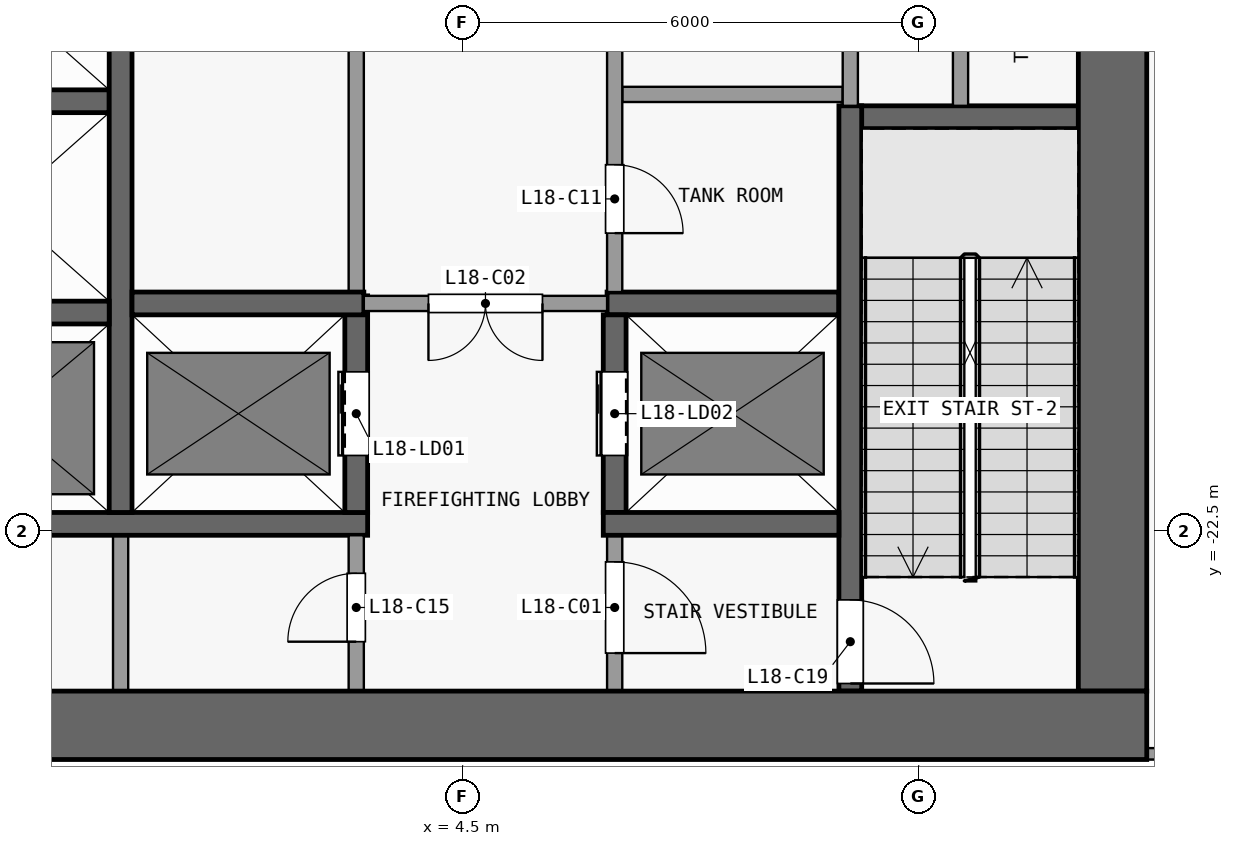
"""IFC4 building model, lengths in metres.
Left out: names, types, materials, properties, quantities, classifications, styles, units other than length and angle.
Written with IfcOpenShell. Run it as: python <this file> out.ifc"""

import sys

from ifc_helpers import new_model, si_unit, direction, frame, frame_2d, origin, place, context, subcontext, project, spatial, rectangle, extrude, element, fill, save


model = new_model("IFC4")
c1 = context("Model", 3, precision=1e-05, world=origin(), true_north=direction((0.0, 1.0)))
c2 = subcontext(c1, "Body", "Model", "MODEL_VIEW")
j1 = project(units=[si_unit("LENGTHUNIT", "METRE"), si_unit("PLANEANGLEUNIT", "RADIAN")], contexts=[c1])
p1 = place(None, origin())
s1 = spatial("IfcSite", under=j1, at=p1, CompositionType="ELEMENT")
p2 = place(p1, origin())
s2 = spatial("IfcBuilding", under=s1, at=p2, CompositionType="ELEMENT")
p3 = place(p2, frame((0.0, 0.0, 75.7)))
s3 = spatial("IfcBuildingStorey", under=s2, at=p3, CompositionType="ELEMENT", Elevation=75.7)
p4 = place(p3, frame((-13.5, -25.05, 0.0), z_axis=(0.0, 0.0, 1.0), x_axis=(1.0, 0.0, 0.0)))
e1 = element("IfcWall", 1, at=p4, inside=s3, PredefinedType="SHEAR", context=c2, shape_type="SweptSolid", body=[
    extrude(rectangle(XDim=27.0, YDim=0.9, at=frame_2d((13.5, 0.0))), origin(), (0.0, 0.0, 1.0), 5.0),
])
p5 = place(p3, frame((13.05, -24.6, 0.0), z_axis=(0.0, 0.0, 1.0), x_axis=(0.0, 1.0, 0.0)))
e2 = element("IfcWall", 2, at=p5, inside=s3, PredefinedType="SHEAR", context=c2, shape_type="SweptSolid", body=[
    extrude(rectangle(XDim=16.1, YDim=0.9, at=frame_2d((8.05, 0.0))), origin(), (0.0, 0.0, 1.0), 5.0),
])
p6 = place(p3, frame((-2.95, -22.4, 0.0), z_axis=(0.0, 0.0, 1.0), x_axis=(1.0, 0.0, 0.0)))
e3 = element("IfcWall", 3, at=p6, inside=s3, PredefinedType="SHEAR", context=c2, shape_type="SweptSolid", body=[
    extrude(rectangle(XDim=6.2, YDim=0.3, at=frame_2d((3.1, 0.0))), origin(), (0.0, 0.0, 1.0), 5.0),
])
p7 = place(p3, frame((6.35, -22.4, 0.0), z_axis=(0.0, 0.0, 1.0), x_axis=(1.0, 0.0, 0.0)))
e4 = element("IfcWall", 4, at=p7, inside=s3, PredefinedType="SHEAR", context=c2, shape_type="SweptSolid", body=[
    extrude(rectangle(XDim=3.1, YDim=0.3, at=frame_2d((1.55, 0.0))), origin(), (0.0, 0.0, 1.0), 5.0),
])
p8 = place(p3, frame((-2.95, -19.62, 0.0), z_axis=(0.0, 0.0, 1.0), x_axis=(1.0, 0.0, 0.0)))
e5 = element("IfcWall", 5, at=p8, inside=s3, PredefinedType="SHEAR", context=c2, shape_type="SweptSolid", body=[
    extrude(rectangle(XDim=2.8, YDim=0.3, at=frame_2d((1.4, 0.0))), origin(), (0.0, 0.0, 1.0), 5.0),
])
p9 = place(p3, frame((0.15, -19.5, 0.0), z_axis=(0.0, 0.0, 1.0), x_axis=(1.0, 0.0, 0.0)))
e6 = element("IfcWall", 6, at=p9, inside=s3, PredefinedType="SHEAR", context=c2, shape_type="SweptSolid", body=[
    extrude(rectangle(XDim=3.05, YDim=0.3, at=frame_2d((1.525, 0.0))), origin(), (0.0, 0.0, 1.0), 5.0),
])
p10 = place(p3, frame((6.4, -19.5, 0.0), z_axis=(0.0, 0.0, 1.0), x_axis=(-1.0, 0.0, 0.0)))
e7 = element("IfcWall", 7, at=p10, inside=s3, PredefinedType="PARTITIONING", context=c2, shape_type="SweptSolid", body=[
    extrude(rectangle(XDim=3.2, YDim=0.2, at=frame_2d((1.6, 0.0))), origin(), (0.0, 0.0, 1.0), 5.0),
])
p11 = place(p10, frame((0.85, 0.0, 0.0)))
e8 = element("IfcOpeningElement", 8, at=p11, cuts=e7, PredefinedType="OPENING", context=c2, shape_type="SweptSolid", body=[
    extrude(rectangle(XDim=1.5, YDim=2.1, at=frame_2d((0.75, 1.05))), frame((0.0, 0.11, 0.0), z_axis=(0.0, -1.0, 0.0), x_axis=(1.0, 0.0, 0.0)), (0.0, 0.0, 1.0), 0.22),
])
p12 = place(p3, frame((6.4, -19.5, 0.0), z_axis=(0.0, 0.0, 1.0), x_axis=(1.0, 0.0, 0.0)))
e9 = element("IfcWall", 9, at=p12, inside=s3, PredefinedType="SHEAR", context=c2, shape_type="SweptSolid", body=[
    extrude(rectangle(XDim=3.05, YDim=0.3, at=frame_2d((1.525, 0.0))), origin(), (0.0, 0.0, 1.0), 5.0),
])
p13 = place(p3, frame((9.5, -17.05, 0.0), z_axis=(0.0, 0.0, 1.0), x_axis=(1.0, 0.0, 0.0)))
e10 = element("IfcWall", 10, at=p13, inside=s3, PredefinedType="SHEAR", context=c2, shape_type="SweptSolid", body=[
    extrude(rectangle(XDim=3.1, YDim=0.3, at=frame_2d((1.55, 0.0))), origin(), (0.0, 0.0, 1.0), 5.0),
])
p14 = place(p3, frame((-2.95, -16.84, 0.0), z_axis=(0.0, 0.0, 1.0), x_axis=(1.0, 0.0, 0.0)))
e11 = element("IfcWall", 11, at=p14, inside=s3, PredefinedType="SHEAR", context=c2, shape_type="SweptSolid", body=[
    extrude(rectangle(XDim=2.8, YDim=0.3, at=frame_2d((1.4, 0.0))), origin(), (0.0, 0.0, 1.0), 5.0),
])
p15 = place(p3, frame((6.6, -16.75, 0.0), z_axis=(0.0, 0.0, 1.0), x_axis=(1.0, 0.0, 0.0)))
e12 = element("IfcWall", 12, at=p15, inside=s3, PredefinedType="PARTITIONING", context=c2, shape_type="SweptSolid", body=[
    extrude(rectangle(XDim=2.9, YDim=0.2, at=frame_2d((1.45, 0.0))), origin(), (0.0, 0.0, 1.0), 5.0),
])
p16 = place(p3, frame((0.0, -24.6, 0.0), z_axis=(0.0, 0.0, 1.0), x_axis=(0.0, 1.0, 0.0)))
e13 = element("IfcWall", 13, at=p16, inside=s3, PredefinedType="PARTITIONING", context=c2, shape_type="SweptSolid", body=[
    extrude(rectangle(XDim=2.05, YDim=0.2, at=frame_2d((1.025, 0.0))), origin(), (0.0, 0.0, 1.0), 5.0),
])
p17 = place(p3, frame((0.0, -22.25, 0.0), z_axis=(0.0, 0.0, 1.0), x_axis=(0.0, 1.0, 0.0)))
e14 = element("IfcWall", 14, at=p17, inside=s3, PredefinedType="SHEAR", context=c2, shape_type="SweptSolid", body=[
    extrude(rectangle(XDim=13.75, YDim=0.3, at=frame_2d((6.875, 0.0))), origin(), (0.0, 0.0, 1.0), 5.0),
])
p18 = place(p3, frame((3.1, -24.6, 0.0), z_axis=(0.0, 0.0, 1.0), x_axis=(0.0, 1.0, 0.0)))
e15 = element("IfcWall", 15, at=p18, inside=s3, PredefinedType="PARTITIONING", context=c2, shape_type="SweptSolid", body=[
    extrude(rectangle(XDim=2.05, YDim=0.2, at=frame_2d((1.025, 0.0))), origin(), (0.0, 0.0, 1.0), 5.0),
])
p19 = place(p18, frame((0.65, 0.0, 0.0)))
e16 = element("IfcOpeningElement", 16, at=p19, cuts=e15, PredefinedType="OPENING", context=c2, shape_type="SweptSolid", body=[
    extrude(rectangle(XDim=0.9, YDim=2.1, at=frame_2d((0.45, 1.05))), frame((0.0, 0.11, 0.0), z_axis=(0.0, -1.0, 0.0), x_axis=(1.0, 0.0, 0.0)), (0.0, 0.0, 1.0), 0.22),
])
p20 = place(p3, frame((3.1, -22.25, 0.0), z_axis=(0.0, 0.0, 1.0), x_axis=(0.0, 1.0, 0.0)))
e17 = element("IfcWall", 17, at=p20, inside=s3, PredefinedType="SHEAR", context=c2, shape_type="SweptSolid", body=[
    extrude(rectangle(XDim=2.85, YDim=0.3, at=frame_2d((1.425, 0.0))), origin(), (0.0, 0.0, 1.0), 5.0),
])
p21 = place(p20, frame((0.75, 0.0, 0.0)))
e18 = element("IfcOpeningElement", 18, at=p21, cuts=e17, PredefinedType="OPENING", context=c2, shape_type="SweptSolid", body=[
    extrude(rectangle(XDim=1.1, YDim=2.1, at=frame_2d((0.55, 1.05))), frame((0.0, 0.16, 0.0), z_axis=(0.0, -1.0, 0.0), x_axis=(1.0, 0.0, 0.0)), (0.0, 0.0, 1.0), 0.32),
])
p22 = place(p3, frame((3.1, -19.6, 0.0), z_axis=(0.0, 0.0, 1.0), x_axis=(0.0, 1.0, 0.0)))
e19 = element("IfcWall", 19, at=p22, inside=s3, PredefinedType="PARTITIONING", context=c2, shape_type="SweptSolid", body=[
    extrude(rectangle(XDim=11.1, YDim=0.2, at=frame_2d((5.55, 0.0))), origin(), (0.0, 0.0, 1.0), 5.0),
])
p23 = place(p22, frame((3.625, 0.0, 0.0)))
e20 = element("IfcOpeningElement", 20, at=p23, cuts=e19, PredefinedType="OPENING", context=c2, shape_type="SweptSolid", body=[
    extrude(rectangle(XDim=1.2, YDim=2.1, at=frame_2d((0.6, 1.05))), frame((0.0, 0.11, 0.0), z_axis=(0.0, -1.0, 0.0), x_axis=(1.0, 0.0, 0.0)), (0.0, 0.0, 1.0), 0.22),
])
p24 = place(p22, frame((9.275, 0.0, 0.0)))
e21 = element("IfcOpeningElement", 21, at=p24, cuts=e19, PredefinedType="OPENING", context=c2, shape_type="SweptSolid", body=[
    extrude(rectangle(XDim=0.9, YDim=2.1, at=frame_2d((0.45, 1.05))), frame((0.0, 0.11, 0.0), z_axis=(0.0, -1.0, 0.0), x_axis=(1.0, 0.0, 0.0)), (0.0, 0.0, 1.0), 0.22),
])
p25 = place(p3, frame((6.5, -22.55, 0.0), z_axis=(0.0, 0.0, 1.0), x_axis=(0.0, -1.0, 0.0)))
e22 = element("IfcWall", 22, at=p25, inside=s3, PredefinedType="PARTITIONING", context=c2, shape_type="SweptSolid", body=[
    extrude(rectangle(XDim=2.05, YDim=0.2, at=frame_2d((1.025, 0.0))), origin(), (0.0, 0.0, 1.0), 5.0),
])
p26 = place(p25, frame((0.35, 0.0, 0.0)))
e23 = element("IfcOpeningElement", 23, at=p26, cuts=e22, PredefinedType="OPENING", context=c2, shape_type="SweptSolid", body=[
    extrude(rectangle(XDim=1.2, YDim=2.1, at=frame_2d((0.6, 1.05))), frame((0.0, 0.11, 0.0), z_axis=(0.0, -1.0, 0.0), x_axis=(1.0, 0.0, 0.0)), (0.0, 0.0, 1.0), 0.22),
])
p27 = place(p3, frame((6.5, -22.25, 0.0), z_axis=(0.0, 0.0, 1.0), x_axis=(0.0, 1.0, 0.0)))
e24 = element("IfcWall", 24, at=p27, inside=s3, PredefinedType="SHEAR", context=c2, shape_type="SweptSolid", body=[
    extrude(rectangle(XDim=2.6, YDim=0.3, at=frame_2d((1.3, 0.0))), origin(), (0.0, 0.0, 1.0), 5.0),
])
p28 = place(p27, frame((0.75, 0.0, 0.0)))
e25 = element("IfcOpeningElement", 25, at=p28, cuts=e24, PredefinedType="OPENING", context=c2, shape_type="SweptSolid", body=[
    extrude(rectangle(XDim=1.1, YDim=2.1, at=frame_2d((0.55, 1.05))), frame((0.0, 0.16, 0.0), z_axis=(0.0, -1.0, 0.0), x_axis=(1.0, 0.0, 0.0)), (0.0, 0.0, 1.0), 0.32),
])
p29 = place(p3, frame((6.5, -8.5, 0.0), z_axis=(0.0, 0.0, 1.0), x_axis=(0.0, -1.0, 0.0)))
e26 = element("IfcWall", 26, at=p29, inside=s3, PredefinedType="PARTITIONING", context=c2, shape_type="SweptSolid", body=[
    extrude(rectangle(XDim=10.85, YDim=0.2, at=frame_2d((5.425, 0.0))), origin(), (0.0, 0.0, 1.0), 5.0),
])
p30 = place(p29, frame((9.175, 0.0, 0.0)))
e27 = element("IfcOpeningElement", 27, at=p30, cuts=e26, PredefinedType="OPENING", context=c2, shape_type="SweptSolid", body=[
    extrude(rectangle(XDim=0.9, YDim=2.1, at=frame_2d((0.45, 1.05))), frame((0.0, 0.11, 0.0), z_axis=(0.0, -1.0, 0.0), x_axis=(1.0, 0.0, 0.0)), (0.0, 0.0, 1.0), 0.22),
])
p31 = place(p29, frame((3.525, 0.0, 0.0)))
e28 = element("IfcOpeningElement", 28, at=p31, cuts=e26, PredefinedType="OPENING", context=c2, shape_type="SweptSolid", body=[
    extrude(rectangle(XDim=1.2, YDim=2.1, at=frame_2d((0.6, 1.05))), frame((0.0, 0.11, 0.0), z_axis=(0.0, -1.0, 0.0), x_axis=(1.0, 0.0, 0.0)), (0.0, 0.0, 1.0), 0.22),
])
p32 = place(p3, frame((9.6, -16.9, 0.0), z_axis=(0.0, 0.0, 1.0), x_axis=(0.0, -1.0, 0.0)))
e29 = element("IfcWall", 29, at=p32, inside=s3, PredefinedType="SHEAR", context=c2, shape_type="SweptSolid", body=[
    extrude(rectangle(XDim=7.7, YDim=0.3, at=frame_2d((3.85, 0.0))), origin(), (0.0, 0.0, 1.0), 5.0),
])
p33 = place(p32, frame((6.5, 0.0, 0.0)))
e30 = element("IfcOpeningElement", 30, at=p33, cuts=e29, PredefinedType="OPENING", context=c2, shape_type="SweptSolid", body=[
    extrude(rectangle(XDim=1.1, YDim=2.1, at=frame_2d((0.55, 1.05))), frame((0.0, 0.16, 0.0), z_axis=(0.0, -1.0, 0.0), x_axis=(1.0, 0.0, 0.0)), (0.0, 0.0, 1.0), 0.32),
])
p34 = place(p3, frame((9.6, -16.9, 0.0), z_axis=(0.0, 0.0, 1.0), x_axis=(0.0, 1.0, 0.0)))
e31 = element("IfcWall", 31, at=p34, inside=s3, PredefinedType="PARTITIONING", context=c2, shape_type="SweptSolid", body=[
    extrude(rectangle(XDim=8.4, YDim=0.2, at=frame_2d((4.2, 0.0))), origin(), (0.0, 0.0, 1.0), 5.0),
])
p35 = place(p3, frame((11.05, -11.9, 0.0), z_axis=(0.0, 0.0, 1.0), x_axis=(0.0, -1.0, 0.0)))
e32 = element("IfcWall", 32, at=p35, inside=s3, PredefinedType="PARTITIONING", context=c2, shape_type="SweptSolid", body=[
    extrude(rectangle(XDim=5.0, YDim=0.2, at=frame_2d((2.5, 0.0))), origin(), (0.0, 0.0, 1.0), 5.0),
])
p36 = place(p35, frame((2.175, 0.0, 0.0)))
e33 = element("IfcOpeningElement", 33, at=p36, cuts=e32, PredefinedType="OPENING", context=c2, shape_type="SweptSolid", body=[
    extrude(rectangle(XDim=0.9, YDim=2.1, at=frame_2d((0.45, 1.05))), frame((0.0, 0.11, 0.0), z_axis=(0.0, -1.0, 0.0), x_axis=(1.0, 0.0, 0.0)), (0.0, 0.0, 1.0), 0.22),
])
p37 = place(p3, frame((22.5, -25.425, 0.0), z_axis=(0.0, 0.0, 1.0), x_axis=(-1.0, 0.0, 0.0)))
e34 = element("IfcWall", 34, at=p37, inside=s3, PredefinedType="SOLIDWALL", context=c2, shape_type="SweptSolid", body=[
    extrude(rectangle(XDim=9.0, YDim=0.15, at=frame_2d((4.5, 0.0))), origin(), (0.0, 0.0, 1.0), 5.0),
])
p38 = place(p37, frame((6.5, 0.0, 1.2)))
e35 = element("IfcOpeningElement", 35, at=p38, cuts=e34, PredefinedType="OPENING", context=c2, shape_type="SweptSolid", body=[
    extrude(rectangle(XDim=2.0, YDim=3.0, at=frame_2d((1.0, 1.5))), frame((0.0, 0.085, 0.0), z_axis=(0.0, -1.0, 0.0), x_axis=(1.0, 0.0, 0.0)), (0.0, 0.0, 1.0), 0.17),
])
p39 = place(p37, frame((1.2, 0.0, 1.2)))
e36 = element("IfcOpeningElement", 36, at=p39, cuts=e34, PredefinedType="OPENING", context=c2, shape_type="SweptSolid", body=[
    extrude(rectangle(XDim=3.6, YDim=3.0, at=frame_2d((1.8, 1.5))), frame((0.0, 0.085, 0.0), z_axis=(0.0, -1.0, 0.0), x_axis=(1.0, 0.0, 0.0)), (0.0, 0.0, 1.0), 0.17),
])
p40 = place(p21, origin())
e37 = element("IfcDoor", 37, at=p40, inside=s3, OperationType="DOUBLE_DOOR_SLIDING", PredefinedType="DOOR", context=c2, shape_type="SweptSolid", body=[
    extrude(rectangle(XDim=1.1, YDim=2.1, at=frame_2d((0.55, 1.05))), frame((0.0, 0.025, 0.0), z_axis=(0.0, -1.0, 0.0), x_axis=(1.0, 0.0, 0.0)), (0.0, 0.0, 1.0), 0.05),
])
fill(e18, e37)
p41 = place(p28, origin())
e38 = element("IfcDoor", 38, at=p41, inside=s3, OperationType="DOUBLE_DOOR_SLIDING", PredefinedType="DOOR", context=c2, shape_type="SweptSolid", body=[
    extrude(rectangle(XDim=1.1, YDim=2.1, at=frame_2d((0.55, 1.05))), frame((0.0, 0.025, 0.0), z_axis=(0.0, -1.0, 0.0), x_axis=(1.0, 0.0, 0.0)), (0.0, 0.0, 1.0), 0.05),
])
fill(e25, e38)
p42 = place(p26, origin())
e39 = element("IfcDoor", 39, at=p42, inside=s3, OperationType="SINGLE_SWING_RIGHT", PredefinedType="DOOR", context=c2, shape_type="SweptSolid", body=[
    extrude(rectangle(XDim=1.2, YDim=2.1, at=frame_2d((0.6, 1.05))), frame((0.0, 0.025, 0.0), z_axis=(0.0, -1.0, 0.0), x_axis=(1.0, 0.0, 0.0)), (0.0, 0.0, 1.0), 0.05),
])
fill(e23, e39)
p43 = place(p11, origin())
e40 = element("IfcDoor", 40, at=p43, inside=s3, OperationType="DOUBLE_DOOR_SINGLE_SWING", PredefinedType="DOOR", context=c2, shape_type="SweptSolid", body=[
    extrude(rectangle(XDim=1.5, YDim=2.1, at=frame_2d((0.75, 1.05))), frame((0.0, 0.025, 0.0), z_axis=(0.0, -1.0, 0.0), x_axis=(1.0, 0.0, 0.0)), (0.0, 0.0, 1.0), 0.05),
])
fill(e8, e40)
p44 = place(p30, origin())
e41 = element("IfcDoor", 41, at=p44, inside=s3, OperationType="SINGLE_SWING_RIGHT", PredefinedType="DOOR", context=c2, shape_type="SweptSolid", body=[
    extrude(rectangle(XDim=0.9, YDim=2.1, at=frame_2d((0.45, 1.05))), frame((0.0, 0.025, 0.0), z_axis=(0.0, -1.0, 0.0), x_axis=(1.0, 0.0, 0.0)), (0.0, 0.0, 1.0), 0.05),
])
fill(e27, e41)
p45 = place(p19, origin())
e42 = element("IfcDoor", 42, at=p45, inside=s3, OperationType="SINGLE_SWING_LEFT", PredefinedType="DOOR", context=c2, shape_type="SweptSolid", body=[
    extrude(rectangle(XDim=0.9, YDim=2.1, at=frame_2d((0.45, 1.05))), frame((0.0, 0.025, 0.0), z_axis=(0.0, -1.0, 0.0), x_axis=(1.0, 0.0, 0.0)), (0.0, 0.0, 1.0), 0.05),
])
fill(e16, e42)
p46 = place(p33, origin())
e43 = element("IfcDoor", 43, at=p46, inside=s3, OperationType="SINGLE_SWING_RIGHT", PredefinedType="DOOR", context=c2, shape_type="SweptSolid", body=[
    extrude(rectangle(XDim=1.1, YDim=2.1, at=frame_2d((0.55, 1.05))), frame((0.0, 0.025, 0.0), z_axis=(0.0, -1.0, 0.0), x_axis=(1.0, 0.0, 0.0)), (0.0, 0.0, 1.0), 0.05),
])
fill(e30, e43)
save(model, sys.argv[1])
